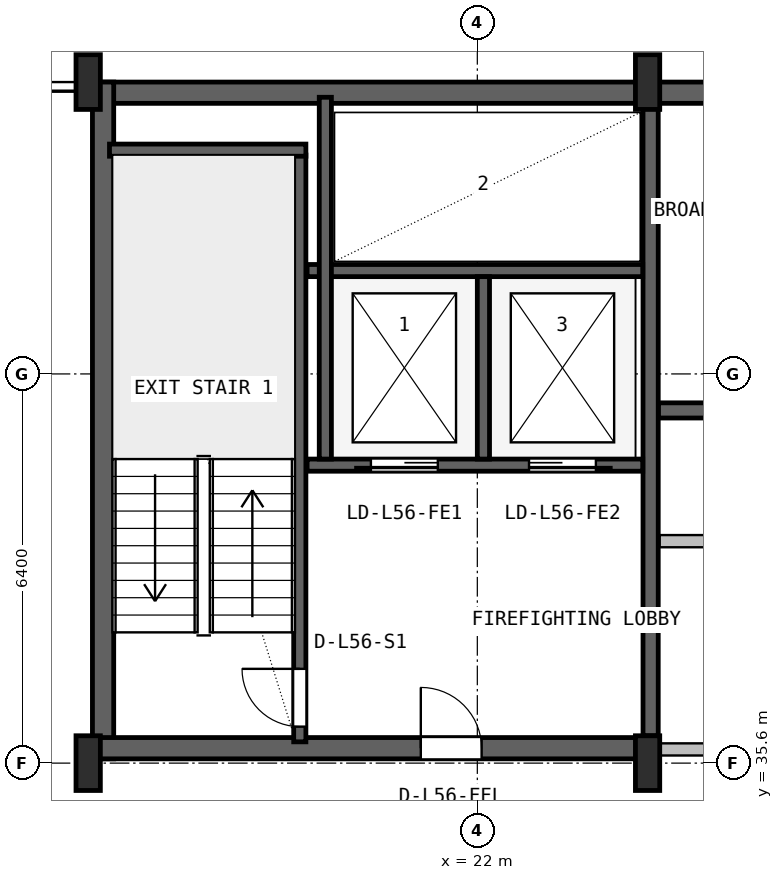
"""IFC4 building model, lengths in metres.
Left out: names, types, materials, properties, quantities, classifications, styles, units other than length and angle.
Written with IfcOpenShell. Run it as: python <this file> out.ifc"""

import sys

from ifc_helpers import new_model, si_unit, direction, frame, frame_2d, origin, origin_2d, place, context, subcontext, project, spatial, rectangle, i_section, extrude, source, transform, mapped, element, fill, save


model = new_model("IFC4")
c1 = context("Model", 3, precision=1e-05, world=origin(), true_north=direction((0.0, 1.0)))
c2 = subcontext(c1, "Body", "Model", "MODEL_VIEW")
j1 = project(units=[si_unit("LENGTHUNIT", "METRE"), si_unit("PLANEANGLEUNIT", "RADIAN")], contexts=[c1])
p1 = place(None, origin())
s1 = spatial("IfcSite", under=j1, at=p1, CompositionType="ELEMENT")
p2 = place(p1, origin())
s2 = spatial("IfcBuilding", under=s1, at=p2, CompositionType="ELEMENT")
p3 = place(p2, frame((0.0, 0.0, 226.4)))
s3 = spatial("IfcBuildingStorey", under=s2, at=p3, CompositionType="ELEMENT", Elevation=226.4)
p4 = place(p3, frame((15.6, 46.625, 0.0), z_axis=(0.0, 0.0, 1.0), x_axis=(1.0, 0.0, 0.0)))
e1 = element("IfcWall", 1, at=p4, inside=s3, PredefinedType="SHEAR", context=c2, shape_type="SweptSolid", body=[
    extrude(rectangle(XDim=36.8, YDim=0.35, at=frame_2d((18.4, 0.0))), origin(), (0.0, 0.0, 1.0), 3.55),
])
p5 = place(p3, frame((15.845, 35.67, 0.0), z_axis=(0.0, 0.0, 1.0), x_axis=(0.0, 1.0, 0.0)))
e2 = element("IfcWall", 2, at=p5, inside=s3, PredefinedType="SHEAR", context=c2, shape_type="SweptSolid", body=[
    extrude(rectangle(XDim=11.13, YDim=0.35, at=frame_2d((5.565, 0.0))), origin(), (0.0, 0.0, 1.0), 3.55),
])
p6 = place(p3, frame((15.67, 35.845, 0.0), z_axis=(0.0, 0.0, 1.0), x_axis=(1.0, 0.0, 0.0)))
e3 = element("IfcWall", 3, at=p6, inside=s3, PredefinedType="SHEAR", context=c2, shape_type="SweptSolid", body=[
    extrude(rectangle(XDim=9.13, YDim=0.35, at=frame_2d((4.565, 0.0))), origin(), (0.0, 0.0, 1.0), 3.55),
])
p7 = place(p6, frame((5.4, 0.0, 0.0)))
e4 = element("IfcOpeningElement", 4, at=p7, cuts=e3, PredefinedType="OPENING", context=c2, shape_type="SweptSolid", body=[
    extrude(rectangle(XDim=1.0, YDim=2.1, at=frame_2d((0.5, 1.05))), frame((0.0, 0.185, 0.0), z_axis=(0.0, -1.0, 0.0), x_axis=(1.0, 0.0, 0.0)), (0.0, 0.0, 1.0), 0.37),
])
m1 = source(origin(), c2, "Body", "SweptSolid", [
    extrude(i_section(OverallWidth=0.4, OverallDepth=0.9, WebThickness=0.016, FlangeThickness=0.028, FilletRadius=0.016, at=origin_2d()), origin(), (0.0, 0.0, 1.0), 3.8),
])
for number, where, z_axis, x_axis in (
    (5, (15.6, 35.6, 0.0), (0.0, 0.0, 1.0), (1.0, 0.0, 0.0)),
    (6, (15.6, 46.8, 0.0), (0.0, 0.0, 1.0), (1.0, 0.0, 0.0)),
    (7, (24.8, 35.6, 0.0), (0.0, 0.0, 1.0), (1.0, 0.0, 0.0)),
    (8, (24.8, 46.8, 0.0), (0.0, 0.0, 1.0), (1.0, 0.0, 0.0)),
):
    element("IfcColumn", number, at=place(p3, frame(where, z_axis=z_axis, x_axis=x_axis)), inside=s3, PredefinedType="COLUMN", context=c2, shape_type="MappedRepresentation", body=[
        mapped(m1, transform((0.0, 0.0, 0.0), x_axis=(1.0, 0.0, 0.0), y_axis=(0.0, 1.0, 0.0), z_axis=(0.0, 0.0, 1.0), scale=1.0)),
    ])
p8 = place(p3, frame((19.08, 35.95, 0.0), z_axis=(0.0, 0.0, 1.0), x_axis=(0.0, 1.0, 0.0)))
e9 = element("IfcWall", 9, at=p8, inside=s3, PredefinedType="SHEAR", context=c2, shape_type="SweptSolid", body=[
    extrude(rectangle(XDim=9.65, YDim=0.2, at=frame_2d((4.825, 0.0))), origin(), (0.0, 0.0, 1.0), 3.55),
])
p9 = place(p8, frame((0.25, 0.0, 0.0)))
e10 = element("IfcOpeningElement", 10, at=p9, cuts=e9, PredefinedType="OPENING", context=c2, shape_type="SweptSolid", body=[
    extrude(rectangle(XDim=0.95, YDim=2.1, at=frame_2d((0.475, 1.05))), frame((0.0, 0.11, 0.0), z_axis=(0.0, -1.0, 0.0), x_axis=(1.0, 0.0, 0.0)), (0.0, 0.0, 1.0), 0.22),
])
p10 = place(p3, frame((15.95, 45.68, 0.0), z_axis=(0.0, 0.0, 1.0), x_axis=(1.0, 0.0, 0.0)))
e11 = element("IfcWall", 11, at=p10, inside=s3, PredefinedType="SHEAR", context=c2, shape_type="SweptSolid", body=[
    extrude(rectangle(XDim=3.23, YDim=0.2, at=frame_2d((1.615, 0.0))), origin(), (0.0, 0.0, 1.0), 3.55),
])
p11 = place(p3, frame((24.85, 36.05, 0.0), z_axis=(0.0, 0.0, 1.0), x_axis=(0.0, 1.0, 0.0)))
e12 = element("IfcWall", 12, at=p11, inside=s3, PredefinedType="SHEAR", context=c2, shape_type="SweptSolid", body=[
    extrude(rectangle(XDim=10.45, YDim=0.25, at=frame_2d((5.225, 0.0))), origin(), (0.0, 0.0, 1.0), 3.55),
])
p12 = place(p3, frame((19.2, 40.5, 0.0), z_axis=(0.0, 0.0, 1.0), x_axis=(1.0, 0.0, 0.0)))
e13 = element("IfcWall", 13, at=p12, inside=s3, PredefinedType="SHEAR", context=c2, shape_type="SweptSolid", body=[
    extrude(rectangle(XDim=5.52, YDim=0.2, at=frame_2d((2.76, 0.0))), origin(), (0.0, 0.0, 1.0), 3.55),
])
p13 = place(p12, frame((1.05, 0.0, 0.0)))
e14 = element("IfcOpeningElement", 14, at=p13, cuts=e13, PredefinedType="OPENING", context=c2, shape_type="SweptSolid", body=[
    extrude(rectangle(XDim=1.1, YDim=2.18, at=frame_2d((0.55, 1.09))), frame((0.0, 0.11, 0.0), z_axis=(0.0, -1.0, 0.0), x_axis=(1.0, 0.0, 0.0)), (0.0, 0.0, 1.0), 0.22),
])
p14 = place(p12, frame((3.65, 0.0, 0.0)))
e15 = element("IfcOpeningElement", 15, at=p14, cuts=e13, PredefinedType="OPENING", context=c2, shape_type="SweptSolid", body=[
    extrude(rectangle(XDim=1.1, YDim=2.18, at=frame_2d((0.55, 1.09))), frame((0.0, 0.11, 0.0), z_axis=(0.0, -1.0, 0.0), x_axis=(1.0, 0.0, 0.0)), (0.0, 0.0, 1.0), 0.22),
])
p15 = place(p3, frame((19.2, 43.7, 0.0), z_axis=(0.0, 0.0, 1.0), x_axis=(1.0, 0.0, 0.0)))
e16 = element("IfcWall", 16, at=p15, inside=s3, PredefinedType="SHEAR", context=c2, shape_type="SweptSolid", body=[
    extrude(rectangle(XDim=5.52, YDim=0.2, at=frame_2d((2.76, 0.0))), origin(), (0.0, 0.0, 1.0), 3.55),
])
p16 = place(p3, frame((22.1, 40.6, 0.0), z_axis=(0.0, 0.0, 1.0), x_axis=(0.0, 1.0, 0.0)))
e17 = element("IfcWall", 17, at=p16, inside=s3, PredefinedType="SHEAR", context=c2, shape_type="SweptSolid", body=[
    extrude(rectangle(XDim=3.0, YDim=0.2, at=frame_2d((1.5, 0.0))), origin(), (0.0, 0.0, 1.0), 3.55),
])
p17 = place(p3, frame((19.5, 40.6, 0.0), z_axis=(0.0, 0.0, 1.0), x_axis=(0.0, 1.0, 0.0)))
e18 = element("IfcWall", 18, at=p17, inside=s3, PredefinedType="SHEAR", context=c2, shape_type="SweptSolid", body=[
    extrude(rectangle(XDim=5.95, YDim=0.2, at=frame_2d((2.975, 0.0))), origin(), (0.0, 0.0, 1.0), 3.55),
])
p18 = place(p3, frame((24.98, 41.4, 0.0), z_axis=(0.0, 0.0, 1.0), x_axis=(1.0, 0.0, 0.0)))
e19 = element("IfcWall", 19, at=p18, inside=s3, PredefinedType="SHEAR", context=c2, shape_type="SweptSolid", body=[
    extrude(rectangle(XDim=23.82, YDim=0.25, at=frame_2d((11.91, 0.0))), origin(), (0.0, 0.0, 1.0), 3.55),
])
p19 = place(p18, frame((16.87, 0.0, 0.0)))
e20 = element("IfcOpeningElement", 20, at=p19, cuts=e19, PredefinedType="OPENING", context=c2, shape_type="SweptSolid", body=[
    extrude(rectangle(XDim=1.1, YDim=2.18, at=frame_2d((0.55, 1.09))), frame((0.0, 0.135, 0.0), z_axis=(0.0, -1.0, 0.0), x_axis=(1.0, 0.0, 0.0)), (0.0, 0.0, 1.0), 0.27),
])
p20 = place(p18, frame((19.47, 0.0, 0.0)))
e21 = element("IfcOpeningElement", 21, at=p20, cuts=e19, PredefinedType="OPENING", context=c2, shape_type="SweptSolid", body=[
    extrude(rectangle(XDim=1.1, YDim=2.18, at=frame_2d((0.55, 1.09))), frame((0.0, 0.135, 0.0), z_axis=(0.0, -1.0, 0.0), x_axis=(1.0, 0.0, 0.0)), (0.0, 0.0, 1.0), 0.27),
])
p21 = place(p18, frame((22.07, 0.0, 0.0)))
e22 = element("IfcOpeningElement", 22, at=p21, cuts=e19, PredefinedType="OPENING", context=c2, shape_type="SweptSolid", body=[
    extrude(rectangle(XDim=1.1, YDim=2.18, at=frame_2d((0.55, 1.09))), frame((0.0, 0.135, 0.0), z_axis=(0.0, -1.0, 0.0), x_axis=(1.0, 0.0, 0.0)), (0.0, 0.0, 1.0), 0.27),
])
p22 = place(p18, frame((3.56, 0.0, 0.0)))
e23 = element("IfcOpeningElement", 23, at=p22, cuts=e19, PredefinedType="OPENING", context=c2, shape_type="SweptSolid", body=[
    extrude(rectangle(XDim=1.0, YDim=2.08, at=frame_2d((0.5, 1.04))), frame((0.0, 0.135, 0.0), z_axis=(0.0, -1.0, 0.0), x_axis=(1.0, 0.0, 0.0)), (0.0, 0.0, 1.0), 0.27),
])
p23 = place(p18, frame((9.76, 0.0, 0.0)))
e24 = element("IfcOpeningElement", 24, at=p23, cuts=e19, PredefinedType="OPENING", context=c2, shape_type="SweptSolid", body=[
    extrude(rectangle(XDim=0.92, YDim=2.08, at=frame_2d((0.46, 1.04))), frame((0.0, 0.135, 0.0), z_axis=(0.0, -1.0, 0.0), x_axis=(1.0, 0.0, 0.0)), (0.0, 0.0, 1.0), 0.27),
])
p24 = place(p18, frame((13.66, 0.0, 0.0)))
e25 = element("IfcOpeningElement", 25, at=p24, cuts=e19, PredefinedType="OPENING", context=c2, shape_type="SweptSolid", body=[
    extrude(rectangle(XDim=0.92, YDim=2.08, at=frame_2d((0.46, 1.04))), frame((0.0, 0.135, 0.0), z_axis=(0.0, -1.0, 0.0), x_axis=(1.0, 0.0, 0.0)), (0.0, 0.0, 1.0), 0.27),
])
p25 = place(p3, frame((25.0, 35.825, 0.0), z_axis=(0.0, 0.0, 1.0), x_axis=(1.0, 0.0, 0.0)))
e26 = element("IfcWall", 26, at=p25, inside=s3, PredefinedType="PLUMBINGWALL", context=c2, shape_type="SweptSolid", body=[
    extrude(rectangle(XDim=9.75, YDim=0.2, at=frame_2d((4.875, 0.0))), origin(), (0.0, 0.0, 1.0), 2.575),
])
p26 = place(p3, frame((25.0, 39.25, 0.0), z_axis=(0.0, 0.0, 1.0), x_axis=(1.0, 0.0, 0.0)))
e27 = element("IfcWall", 27, at=p26, inside=s3, PredefinedType="PLUMBINGWALL", context=c2, shape_type="SweptSolid", body=[
    extrude(rectangle(XDim=9.75, YDim=0.2, at=frame_2d((4.875, 0.0))), origin(), (0.0, 0.0, 1.0), 3.53),
])
p27 = place(p26, frame((1.75, 0.0, 0.0)))
e28 = element("IfcOpeningElement", 28, at=p27, cuts=e27, PredefinedType="OPENING", context=c2, shape_type="SweptSolid", body=[
    extrude(rectangle(XDim=0.9, YDim=2.06, at=frame_2d((0.45, 1.03))), frame((0.0, 0.11, 0.0), z_axis=(0.0, -1.0, 0.0), x_axis=(1.0, 0.0, 0.0)), (0.0, 0.0, 1.0), 0.22),
])
p28 = place(p26, frame((6.725, 0.0, 0.0)))
e29 = element("IfcOpeningElement", 29, at=p28, cuts=e27, PredefinedType="OPENING", context=c2, shape_type="SweptSolid", body=[
    extrude(rectangle(XDim=0.9, YDim=2.06, at=frame_2d((0.45, 1.03))), frame((0.0, 0.11, 0.0), z_axis=(0.0, -1.0, 0.0), x_axis=(1.0, 0.0, 0.0)), (0.0, 0.0, 1.0), 0.22),
])
m2 = source(origin(), c2, "Body", "SweptSolid", [
    extrude(rectangle(XDim=0.95, YDim=2.1, at=frame_2d((0.475, 1.05))), frame((0.0, 0.025, 0.0), z_axis=(0.0, -1.0, 0.0), x_axis=(1.0, 0.0, 0.0)), (0.0, 0.0, 1.0), 0.05),
])
p29 = place(p9, origin())
e30 = element("IfcDoor", 30, at=p29, inside=s3, OperationType="SINGLE_SWING_RIGHT", PredefinedType="DOOR", context=c2, shape_type="MappedRepresentation", body=[
    mapped(m2, transform((0.0, 0.0, 0.0), x_axis=(1.0, 0.0, 0.0), y_axis=(0.0, 1.0, 0.0), z_axis=(0.0, 0.0, 1.0), scale=1.0)),
])
fill(e10, e30)
m3 = source(origin(), c2, "Body", "SweptSolid", [
    extrude(rectangle(XDim=1.0, YDim=2.1, at=frame_2d((0.5, 1.05))), frame((0.0, 0.025, 0.0), z_axis=(0.0, -1.0, 0.0), x_axis=(1.0, 0.0, 0.0)), (0.0, 0.0, 1.0), 0.05),
])
p30 = place(p7, origin())
e31 = element("IfcDoor", 31, at=p30, inside=s3, OperationType="SINGLE_SWING_LEFT", PredefinedType="DOOR", context=c2, shape_type="MappedRepresentation", body=[
    mapped(m3, transform((0.0, 0.0, 0.0), x_axis=(1.0, 0.0, 0.0), y_axis=(0.0, 1.0, 0.0), z_axis=(0.0, 0.0, 1.0), scale=1.0)),
])
fill(e4, e31)
m4 = source(origin(), c2, "Body", "SweptSolid", [
    extrude(rectangle(XDim=1.1, YDim=2.18, at=frame_2d((0.55, 1.09))), frame((0.0, 0.025, 0.0), z_axis=(0.0, -1.0, 0.0), x_axis=(1.0, 0.0, 0.0)), (0.0, 0.0, 1.0), 0.05),
])
p31 = place(p13, frame((1.1, 0.0, 0.0), z_axis=(0.0, 0.0, 1.0), x_axis=(-1.0, 0.0, 0.0)))
e32 = element("IfcDoor", 32, at=p31, inside=s3, OperationType="SLIDING_TO_LEFT", PredefinedType="DOOR", context=c2, shape_type="MappedRepresentation", body=[
    mapped(m4, transform((0.0, 0.0, 0.0), x_axis=(1.0, 0.0, 0.0), y_axis=(0.0, 1.0, 0.0), z_axis=(0.0, 0.0, 1.0), scale=1.0)),
])
fill(e14, e32)
p32 = place(p14, frame((1.1, 0.0, 0.0), z_axis=(0.0, 0.0, 1.0), x_axis=(-1.0, 0.0, 0.0)))
e33 = element("IfcDoor", 33, at=p32, inside=s3, OperationType="SLIDING_TO_RIGHT", PredefinedType="DOOR", context=c2, shape_type="MappedRepresentation", body=[
    mapped(m4, transform((0.0, 0.0, 0.0), x_axis=(1.0, 0.0, 0.0), y_axis=(0.0, 1.0, 0.0), z_axis=(0.0, 0.0, 1.0), scale=1.0)),
])
fill(e15, e33)
save(model, sys.argv[1])
